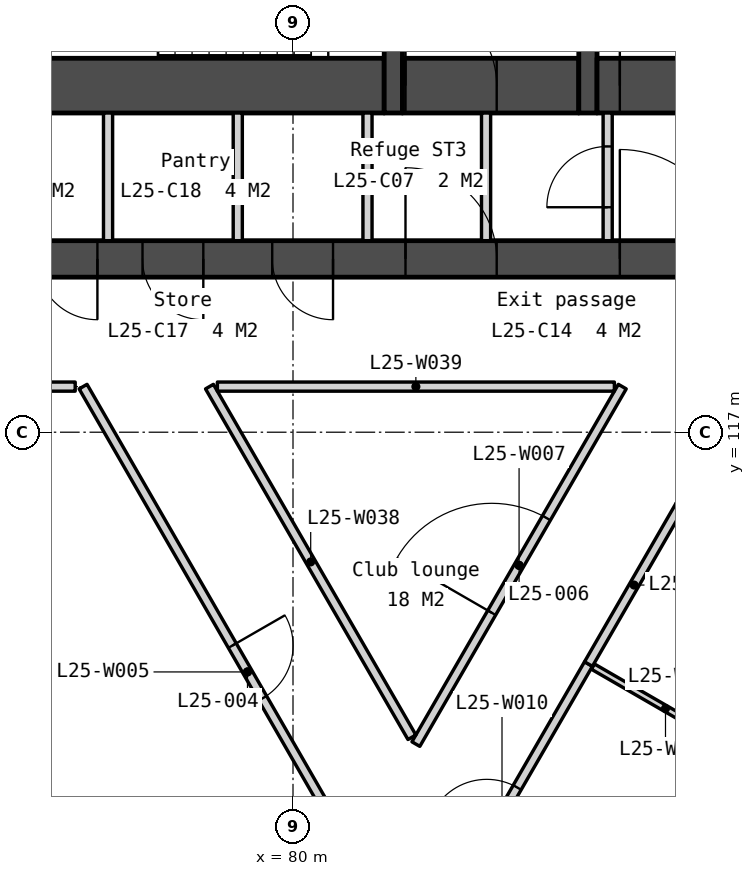
"""IFC4 building model, lengths in metres.
Left out: names, types, materials, properties, quantities, classifications, styles, units other than length and angle.
Written with IfcOpenShell. Run it as: python <this file> out.ifc"""

import sys

from ifc_helpers import new_model, si_unit, direction, frame, frame_2d, origin, place, context, subcontext, project, spatial, polyline, rectangle, outline, extrude, element, fill, save


model = new_model("IFC4")
c1 = context("Model", 3, precision=1e-05, world=origin(), true_north=direction((0.0, 1.0)))
c2 = subcontext(c1, "Body", "Model", "MODEL_VIEW")
j1 = project(units=[si_unit("LENGTHUNIT", "METRE"), si_unit("PLANEANGLEUNIT", "RADIAN")], contexts=[c1])
p1 = place(None, origin())
s1 = spatial("IfcSite", under=j1, at=p1, CompositionType="ELEMENT")
p2 = place(p1, origin())
s2 = spatial("IfcBuilding", under=s1, at=p2, CompositionType="ELEMENT")
p3 = place(p2, frame((0.0, 0.0, 102.8)))
s3 = spatial("IfcBuildingStorey", under=s2, at=p3, CompositionType="ELEMENT", Elevation=102.8)
p4 = place(p3, frame((66.0, 119.85, 0.0), z_axis=(0.0, 0.0, 1.0), x_axis=(1.0, 0.0, 0.0)))
e1 = element("IfcWall", 1, at=p4, inside=s3, PredefinedType="SOLIDWALL", context=c2, shape_type="SweptSolid", body=[
    extrude(rectangle(XDim=28.0, YDim=0.6, at=frame_2d((14.0, 0.0))), origin(), (0.0, 0.0, 1.0), 3.35),
])
p5 = place(p4, frame((6.825, 0.0, 0.0)))
e2 = element("IfcOpeningElement", 2, at=p5, cuts=e1, PredefinedType="OPENING", context=c2, shape_type="SweptSolid", body=[
    extrude(rectangle(XDim=1.8, YDim=2.1, at=frame_2d((0.9, 1.05))), frame((0.0, 0.31, 0.0), z_axis=(0.0, -1.0, 0.0), x_axis=(1.0, 0.0, 0.0)), (0.0, 0.0, 1.0), 0.62),
])
p6 = place(p4, frame((15.85, 0.0, 0.0)))
e3 = element("IfcOpeningElement", 3, at=p6, cuts=e1, PredefinedType="OPENING", context=c2, shape_type="SweptSolid", body=[
    extrude(rectangle(XDim=1.5, YDim=2.1, at=frame_2d((0.75, 1.05))), frame((0.0, 0.31, 0.0), z_axis=(0.0, -1.0, 0.0), x_axis=(1.0, 0.0, 0.0)), (0.0, 0.0, 1.0), 0.62),
])
p7 = place(p4, frame((19.375, 0.0, 0.0)))
e4 = element("IfcOpeningElement", 4, at=p7, cuts=e1, PredefinedType="OPENING", context=c2, shape_type="SweptSolid", body=[
    extrude(rectangle(XDim=1.8, YDim=2.1, at=frame_2d((0.9, 1.05))), frame((0.0, 0.31, 0.0), z_axis=(0.0, -1.0, 0.0), x_axis=(1.0, 0.0, 0.0)), (0.0, 0.0, 1.0), 0.62),
])
p8 = place(p4, frame((4.425, 0.0, 0.0)))
e5 = element("IfcOpeningElement", 5, at=p8, cuts=e1, PredefinedType="OPENING", context=c2, shape_type="SweptSolid", body=[
    extrude(rectangle(XDim=1.0, YDim=2.1, at=frame_2d((0.5, 1.05))), frame((0.0, 0.31, 0.0), z_axis=(0.0, -1.0, 0.0), x_axis=(1.0, 0.0, 0.0)), (0.0, 0.0, 1.0), 0.62),
])
p9 = place(p4, frame((9.783, 0.0, 0.0)))
e6 = element("IfcOpeningElement", 6, at=p9, cuts=e1, PredefinedType="OPENING", context=c2, shape_type="SweptSolid", body=[
    extrude(rectangle(XDim=1.0, YDim=2.1, at=frame_2d((0.5, 1.05))), frame((0.0, 0.31, 0.0), z_axis=(0.0, -1.0, 0.0), x_axis=(1.0, 0.0, 0.0)), (0.0, 0.0, 1.0), 0.62),
])
p10 = place(p4, frame((11.525, 0.0, 0.0)))
e7 = element("IfcOpeningElement", 7, at=p10, cuts=e1, PredefinedType="OPENING", context=c2, shape_type="SweptSolid", body=[
    extrude(rectangle(XDim=1.0, YDim=2.1, at=frame_2d((0.5, 1.05))), frame((0.0, 0.31, 0.0), z_axis=(0.0, -1.0, 0.0), x_axis=(1.0, 0.0, 0.0)), (0.0, 0.0, 1.0), 0.62),
])
p11 = place(p4, frame((13.658, 0.0, 0.0)))
e8 = element("IfcOpeningElement", 8, at=p11, cuts=e1, PredefinedType="OPENING", context=c2, shape_type="SweptSolid", body=[
    extrude(rectangle(XDim=1.0, YDim=2.1, at=frame_2d((0.5, 1.05))), frame((0.0, 0.31, 0.0), z_axis=(0.0, -1.0, 0.0), x_axis=(1.0, 0.0, 0.0)), (0.0, 0.0, 1.0), 0.62),
])
p12 = place(p4, frame((22.575, 0.0, 0.0)))
e9 = element("IfcOpeningElement", 9, at=p12, cuts=e1, PredefinedType="OPENING", context=c2, shape_type="SweptSolid", body=[
    extrude(rectangle(XDim=1.0, YDim=2.1, at=frame_2d((0.5, 1.05))), frame((0.0, 0.31, 0.0), z_axis=(0.0, -1.0, 0.0), x_axis=(1.0, 0.0, 0.0)), (0.0, 0.0, 1.0), 0.62),
])
p13 = place(p3, frame((75.3, 122.7, 0.0), z_axis=(0.0, 0.0, 1.0), x_axis=(1.0, 0.0, 0.0)))
e10 = element("IfcWall", 10, at=p13, inside=s3, PredefinedType="SOLIDWALL", context=c2, shape_type="SweptSolid", body=[
    extrude(rectangle(XDim=6.2, YDim=0.9, at=frame_2d((3.1, 0.0))), origin(), (0.0, 0.0, 1.0), 3.35),
])
for number, where, z_axis, x_axis in (
    (11, (76.958, 122.25, 0.0), (0.0, 0.0, 1.0), (0.0, -1.0, 0.0)),
    (12, (79.092, 122.25, 0.0), (0.0, 0.0, 1.0), (0.0, -1.0, 0.0)),
    (13, (81.225, 122.25, 0.0), (0.0, 0.0, 1.0), (0.0, -1.0, 0.0)),
):
    element("IfcWall", number, at=place(p3, frame(where, z_axis=z_axis, x_axis=x_axis)), inside=s3, PredefinedType="PARTITIONING", context=c2, shape_type="SweptSolid", body=[
        extrude(rectangle(XDim=2.1, YDim=0.15, at=frame_2d((1.05, 0.0))), origin(), (0.0, 0.0, 1.0), 3.35),
    ])
p14 = place(p3, frame((81.65, 125.7, 0.0), z_axis=(0.0, 0.0, 1.0), x_axis=(0.0, -1.0, 0.0)))
e14 = element("IfcWall", 14, at=p14, inside=s3, PredefinedType="SOLIDWALL", context=c2, shape_type="SweptSolid", body=[
    extrude(rectangle(XDim=3.45, YDim=0.3, at=frame_2d((1.725, 0.0))), origin(), (0.0, 0.0, 1.0), 3.35),
])
p15 = place(p14, frame((0.75, 0.0, 0.0)))
e15 = element("IfcOpeningElement", 15, at=p15, cuts=e14, PredefinedType="OPENING", context=c2, shape_type="SweptSolid", body=[
    extrude(rectangle(XDim=1.0, YDim=2.1, at=frame_2d((0.5, 1.05))), frame((0.0, 0.16, 0.0), z_axis=(0.0, -1.0, 0.0), x_axis=(1.0, 0.0, 0.0)), (0.0, 0.0, 1.0), 0.32),
])
p16 = place(p3, frame((81.8, 122.7, 0.0), z_axis=(0.0, 0.0, 1.0), x_axis=(1.0, 0.0, 0.0)))
e16 = element("IfcWall", 16, at=p16, inside=s3, PredefinedType="SOLIDWALL", context=c2, shape_type="SweptSolid", body=[
    extrude(rectangle(XDim=2.9, YDim=0.9, at=frame_2d((1.45, 0.0))), origin(), (0.0, 0.0, 1.0), 3.35),
])
p17 = place(p16, frame((0.05, 0.0, 0.0)))
e17 = element("IfcOpeningElement", 17, at=p17, cuts=e16, PredefinedType="OPENING", context=c2, shape_type="SweptSolid", body=[
    extrude(rectangle(XDim=1.5, YDim=2.1, at=frame_2d((0.75, 1.05))), frame((0.0, 0.46, 0.0), z_axis=(0.0, -1.0, 0.0), x_axis=(1.0, 0.0, 0.0)), (0.0, 0.0, 1.0), 0.92),
])
p18 = place(p3, frame((83.175, 122.25, 0.0), z_axis=(0.0, 0.0, 1.0), x_axis=(0.0, -1.0, 0.0)))
e18 = element("IfcWall", 18, at=p18, inside=s3, PredefinedType="PARTITIONING", context=c2, shape_type="SweptSolid", body=[
    extrude(rectangle(XDim=2.1, YDim=0.15, at=frame_2d((1.05, 0.0))), origin(), (0.0, 0.0, 1.0), 3.35),
])
p19 = place(p3, frame((84.85, 133.95, 0.0), z_axis=(0.0, 0.0, 1.0), x_axis=(0.0, -1.0, 0.0)))
e19 = element("IfcWall", 19, at=p19, inside=s3, PredefinedType="SOLIDWALL", context=c2, shape_type="SweptSolid", body=[
    extrude(rectangle(XDim=11.7, YDim=0.3, at=frame_2d((5.85, 0.0))), origin(), (0.0, 0.0, 1.0), 3.35),
])
p20 = place(p3, frame((85.0, 122.7, 0.0), z_axis=(0.0, 0.0, 1.0), x_axis=(1.0, 0.0, 0.0)))
e20 = element("IfcWall", 20, at=p20, inside=s3, PredefinedType="SOLIDWALL", context=c2, shape_type="SweptSolid", body=[
    extrude(rectangle(XDim=2.55, YDim=0.9, at=frame_2d((1.275, 0.0))), origin(), (0.0, 0.0, 1.0), 3.35),
])
p21 = place(p20, frame((0.375, 0.0, 0.0)))
e21 = element("IfcOpeningElement", 21, at=p21, cuts=e20, PredefinedType="OPENING", context=c2, shape_type="SweptSolid", body=[
    extrude(rectangle(XDim=1.8, YDim=2.1, at=frame_2d((0.9, 1.05))), frame((0.0, 0.46, 0.0), z_axis=(0.0, -1.0, 0.0), x_axis=(1.0, 0.0, 0.0)), (0.0, 0.0, 1.0), 0.92),
])
p22 = place(p3, frame((85.175, 122.25, 0.0), z_axis=(0.0, 0.0, 1.0), x_axis=(0.0, -1.0, 0.0)))
e22 = element("IfcWall", 22, at=p22, inside=s3, PredefinedType="PARTITIONING", context=c2, shape_type="SweptSolid", body=[
    extrude(rectangle(XDim=2.1, YDim=0.15, at=frame_2d((1.05, 0.0))), origin(), (0.0, 0.0, 1.0), 3.35),
])
p23 = place(p22, frame((0.55, 0.0, 0.0)))
e23 = element("IfcOpeningElement", 23, at=p23, cuts=e22, PredefinedType="OPENING", context=c2, shape_type="SweptSolid", body=[
    extrude(rectangle(XDim=1.0, YDim=2.1, at=frame_2d((0.5, 1.05))), frame((0.0, 0.085, 0.0), z_axis=(0.0, -1.0, 0.0), x_axis=(1.0, 0.0, 0.0)), (0.0, 0.0, 1.0), 0.17),
])
p24 = place(p3, frame((82.605, 93.333, -0.15), z_axis=(0.0, 0.0, 1.0), x_axis=(0.500000478905, 0.866025127289, 0.0)))
e24 = element("IfcWall", 24, at=p24, inside=s3, PredefinedType="SOLIDWALL", context=c2, shape_type="SweptSolid", body=[
    extrude(outline(polyline([(42.643, 0.0), (42.643, 3.5), (0.0, 3.5), (0.0, 0.0), (42.643, 0.0)])), frame((0.0, 0.225, 0.0), z_axis=(0.0, -1.0, 0.0), x_axis=(1.0, 0.0, 0.0)), (0.0, 0.0, 1.0), 0.45),
])
p25 = place(p24, frame((0.72, 0.0, 1.05)))
e25 = element("IfcOpeningElement", 25, at=p25, cuts=e24, PredefinedType="OPENING", context=c2, shape_type="SweptSolid", body=[
    extrude(rectangle(XDim=1.2, YDim=1.5, at=frame_2d((0.6, 0.75))), frame((0.0, 0.235, 0.0), z_axis=(0.0, -1.0, 0.0), x_axis=(1.0, 0.0, 0.0)), (0.0, 0.0, 1.0), 0.47),
])
p26 = place(p24, frame((7.079, 0.0, 1.05)))
e26 = element("IfcOpeningElement", 26, at=p26, cuts=e24, PredefinedType="OPENING", context=c2, shape_type="SweptSolid", body=[
    extrude(rectangle(XDim=1.2, YDim=1.5, at=frame_2d((0.6, 0.75))), frame((0.0, 0.235, 0.0), z_axis=(0.0, -1.0, 0.0), x_axis=(1.0, 0.0, 0.0)), (0.0, 0.0, 1.0), 0.47),
])
p27 = place(p24, frame((8.779, 0.0, 1.05)))
e27 = element("IfcOpeningElement", 27, at=p27, cuts=e24, PredefinedType="OPENING", context=c2, shape_type="SweptSolid", body=[
    extrude(rectangle(XDim=1.2, YDim=1.5, at=frame_2d((0.6, 0.75))), frame((0.0, 0.235, 0.0), z_axis=(0.0, -1.0, 0.0), x_axis=(1.0, 0.0, 0.0)), (0.0, 0.0, 1.0), 0.47),
])
p28 = place(p24, frame((15.607, 0.0, 1.05)))
e28 = element("IfcOpeningElement", 28, at=p28, cuts=e24, PredefinedType="OPENING", context=c2, shape_type="SweptSolid", body=[
    extrude(rectangle(XDim=1.2, YDim=1.5, at=frame_2d((0.6, 0.75))), frame((0.0, 0.235, 0.0), z_axis=(0.0, -1.0, 0.0), x_axis=(1.0, 0.0, 0.0)), (0.0, 0.0, 1.0), 0.47),
])
p29 = place(p24, frame((17.307, 0.0, 1.05)))
e29 = element("IfcOpeningElement", 29, at=p29, cuts=e24, PredefinedType="OPENING", context=c2, shape_type="SweptSolid", body=[
    extrude(rectangle(XDim=1.2, YDim=1.5, at=frame_2d((0.6, 0.75))), frame((0.0, 0.235, 0.0), z_axis=(0.0, -1.0, 0.0), x_axis=(1.0, 0.0, 0.0)), (0.0, 0.0, 1.0), 0.47),
])
p30 = place(p24, frame((24.136, 0.0, 1.05)))
e30 = element("IfcOpeningElement", 30, at=p30, cuts=e24, PredefinedType="OPENING", context=c2, shape_type="SweptSolid", body=[
    extrude(rectangle(XDim=1.2, YDim=1.5, at=frame_2d((0.6, 0.75))), frame((0.0, 0.235, 0.0), z_axis=(0.0, -1.0, 0.0), x_axis=(1.0, 0.0, 0.0)), (0.0, 0.0, 1.0), 0.47),
])
p31 = place(p24, frame((25.836, 0.0, 1.05)))
e31 = element("IfcOpeningElement", 31, at=p31, cuts=e24, PredefinedType="OPENING", context=c2, shape_type="SweptSolid", body=[
    extrude(rectangle(XDim=1.2, YDim=1.5, at=frame_2d((0.6, 0.75))), frame((0.0, 0.235, 0.0), z_axis=(0.0, -1.0, 0.0), x_axis=(1.0, 0.0, 0.0)), (0.0, 0.0, 1.0), 0.47),
])
p32 = place(p24, frame((32.665, 0.0, 1.05)))
e32 = element("IfcOpeningElement", 32, at=p32, cuts=e24, PredefinedType="OPENING", context=c2, shape_type="SweptSolid", body=[
    extrude(rectangle(XDim=1.2, YDim=1.5, at=frame_2d((0.6, 0.75))), frame((0.0, 0.235, 0.0), z_axis=(0.0, -1.0, 0.0), x_axis=(1.0, 0.0, 0.0)), (0.0, 0.0, 1.0), 0.47),
])
p33 = place(p24, frame((34.365, 0.0, 1.05)))
e33 = element("IfcOpeningElement", 33, at=p33, cuts=e24, PredefinedType="OPENING", context=c2, shape_type="SweptSolid", body=[
    extrude(rectangle(XDim=1.2, YDim=1.5, at=frame_2d((0.6, 0.75))), frame((0.0, 0.235, 0.0), z_axis=(0.0, -1.0, 0.0), x_axis=(1.0, 0.0, 0.0)), (0.0, 0.0, 1.0), 0.47),
])
p34 = place(p24, frame((40.722, 0.0, 1.05)))
e34 = element("IfcOpeningElement", 34, at=p34, cuts=e24, PredefinedType="OPENING", context=c2, shape_type="SweptSolid", body=[
    extrude(rectangle(XDim=1.2, YDim=1.5, at=frame_2d((0.6, 0.75))), frame((0.0, 0.235, 0.0), z_axis=(0.0, -1.0, 0.0), x_axis=(1.0, 0.0, 0.0)), (0.0, 0.0, 1.0), 0.47),
])
p35 = place(p3, frame((76.548, 117.75, 0.0), z_axis=(0.0, 0.0, 1.0), x_axis=(0.499203981413, -0.866484497808, 0.0)))
e35 = element("IfcWall", 35, at=p35, inside=s3, PredefinedType="PARTITIONING", context=c2, shape_type="SweptSolid", body=[
    extrude(rectangle(XDim=10.832, YDim=0.15, at=frame_2d((5.416, 0.0))), origin(), (0.0, 0.0, 1.0), 3.35),
])
p36 = place(p35, frame((4.916, 0.0, 0.0)))
e36 = element("IfcOpeningElement", 36, at=p36, cuts=e35, PredefinedType="OPENING", context=c2, shape_type="SweptSolid", body=[
    extrude(rectangle(XDim=1.0, YDim=2.1, at=frame_2d((0.5, 1.05))), frame((0.0, 0.085, 0.0), z_axis=(0.0, -1.0, 0.0), x_axis=(1.0, 0.0, 0.0)), (0.0, 0.0, 1.0), 0.17),
])
p37 = place(p3, frame((82.021, 111.871, 0.0), z_axis=(0.0, 0.0, 1.0), x_axis=(0.500006764785, 0.866021498099, 0.0)))
e37 = element("IfcWall", 37, at=p37, inside=s3, PredefinedType="PARTITIONING", context=c2, shape_type="SweptSolid", body=[
    extrude(rectangle(XDim=6.789, YDim=0.15, at=frame_2d((3.395, 0.0))), origin(), (0.0, 0.0, 1.0), 3.35),
])
p38 = place(p37, frame((2.495, 0.0, 0.0)))
e38 = element("IfcOpeningElement", 38, at=p38, cuts=e37, PredefinedType="OPENING", context=c2, shape_type="SweptSolid", body=[
    extrude(rectangle(XDim=1.8, YDim=2.1, at=frame_2d((0.9, 1.05))), frame((0.0, 0.085, 0.0), z_axis=(0.0, -1.0, 0.0), x_axis=(1.0, 0.0, 0.0)), (0.0, 0.0, 1.0), 0.17),
])
p39 = place(p3, frame((82.015, 108.26, 0.0), z_axis=(0.0, 0.0, 1.0), x_axis=(0.500002303494, 0.866024073857, 0.0)))
e39 = element("IfcWall", 39, at=p39, inside=s3, PredefinedType="PARTITIONING", context=c2, shape_type="SweptSolid", body=[
    extrude(rectangle(XDim=5.689, YDim=0.15, at=frame_2d((2.844, 0.0))), origin(), (0.0, 0.0, 1.0), 3.35),
])
p40 = place(p39, frame((2.344, 0.0, 0.0)))
e40 = element("IfcOpeningElement", 40, at=p40, cuts=e39, PredefinedType="OPENING", context=c2, shape_type="SweptSolid", body=[
    extrude(rectangle(XDim=1.0, YDim=2.1, at=frame_2d((0.5, 1.05))), frame((0.0, 0.085, 0.0), z_axis=(0.0, -1.0, 0.0), x_axis=(1.0, 0.0, 0.0)), (0.0, 0.0, 1.0), 0.17),
])
p41 = place(p3, frame((84.933, 113.145, 0.0), z_axis=(0.0, 0.0, 1.0), x_axis=(0.866004076171, -0.500036938691, 0.0)))
e41 = element("IfcWall", 41, at=p41, inside=s3, PredefinedType="PARTITIONING", context=c2, shape_type="SweptSolid", body=[
    extrude(rectangle(XDim=2.755, YDim=0.1, at=frame_2d((1.377, 0.0))), origin(), (0.0, 0.0, 1.0), 3.35),
])
p42 = place(p3, frame((84.859, 113.187, 0.0), z_axis=(0.0, 0.0, 1.0), x_axis=(0.50002537861, 0.866010750942, 0.0)))
e42 = element("IfcWall", 42, at=p42, inside=s3, PredefinedType="PARTITIONING", context=c2, shape_type="SweptSolid", body=[
    extrude(rectangle(XDim=3.0, YDim=0.15, at=frame_2d((1.5, 0.0))), origin(), (0.0, 0.0, 1.0), 3.35),
])
p43 = place(p3, frame((83.309, 102.902, 0.0), z_axis=(0.0, 0.0, 1.0), x_axis=(0.499996436937, 0.86602746091, 0.0)))
e43 = element("IfcWall", 43, at=p43, inside=s3, PredefinedType="PARTITIONING", context=c2, shape_type="SweptSolid", body=[
    extrude(rectangle(XDim=12.573, YDim=0.1, at=frame_2d((6.286, 0.0))), origin(), (0.0, 0.0, 1.0), 3.35),
])
p44 = place(p43, frame((5.836, 0.0, 0.0)))
e44 = element("IfcOpeningElement", 44, at=p44, cuts=e43, PredefinedType="OPENING", context=c2, shape_type="SweptSolid", body=[
    extrude(rectangle(XDim=0.9, YDim=2.1, at=frame_2d((0.45, 1.05))), frame((0.0, 0.06, 0.0), z_axis=(0.0, -1.0, 0.0), x_axis=(1.0, 0.0, 0.0)), (0.0, 0.0, 1.0), 0.12),
])
p45 = place(p3, frame((72.506, 117.75, 0.0), z_axis=(0.0, 0.0, 1.0), x_axis=(1.0, 0.0, 0.0)))
e45 = element("IfcWall", 45, at=p45, inside=s3, PredefinedType="PARTITIONING", context=c2, shape_type="SweptSolid", body=[
    extrude(rectangle(XDim=3.912, YDim=0.15, at=frame_2d((1.956, 0.0))), origin(), (0.0, 0.0, 1.0), 3.35),
])
p46 = place(p3, frame((78.626, 117.75, 0.0), z_axis=(0.0, 0.0, 1.0), x_axis=(0.499995378973, -0.866028071719, 0.0)))
e46 = element("IfcWall", 46, at=p46, inside=s3, PredefinedType="PARTITIONING", context=c2, shape_type="SweptSolid", body=[
    extrude(rectangle(XDim=6.659, YDim=0.15, at=frame_2d((3.33, 0.0))), origin(), (0.0, 0.0, 1.0), 3.35),
])
p47 = place(p3, frame((78.756, 117.75, 0.0), z_axis=(0.0, 0.0, 1.0), x_axis=(1.0, 0.0, 0.0)))
e47 = element("IfcWall", 47, at=p47, inside=s3, PredefinedType="PARTITIONING", context=c2, shape_type="SweptSolid", body=[
    extrude(rectangle(XDim=6.529, YDim=0.15, at=frame_2d((3.265, 0.0))), origin(), (0.0, 0.0, 1.0), 3.35),
])
p48 = place(p21, origin())
e48 = element("IfcDoor", 48, at=p48, inside=s3, OperationType="DOUBLE_DOOR_DOUBLE_SWING", PredefinedType="DOOR", context=c2, shape_type="SweptSolid", body=[
    extrude(rectangle(XDim=1.8, YDim=2.1, at=frame_2d((0.9, 1.05))), frame((0.0, 0.025, 0.0), z_axis=(0.0, -1.0, 0.0), x_axis=(1.0, 0.0, 0.0)), (0.0, 0.0, 1.0), 0.05),
])
fill(e21, e48)
p49 = place(p17, origin())
e49 = element("IfcDoor", 49, at=p49, inside=s3, OperationType="DOUBLE_DOOR_DOUBLE_SWING", PredefinedType="DOOR", context=c2, shape_type="SweptSolid", body=[
    extrude(rectangle(XDim=1.5, YDim=2.1, at=frame_2d((0.75, 1.05))), frame((0.0, 0.025, 0.0), z_axis=(0.0, -1.0, 0.0), x_axis=(1.0, 0.0, 0.0)), (0.0, 0.0, 1.0), 0.05),
])
fill(e17, e49)
p50 = place(p6, origin())
e50 = element("IfcDoor", 50, at=p50, inside=s3, OperationType="DOUBLE_DOOR_DOUBLE_SWING", PredefinedType="DOOR", context=c2, shape_type="SweptSolid", body=[
    extrude(rectangle(XDim=1.5, YDim=2.1, at=frame_2d((0.75, 1.05))), frame((0.0, 0.025, 0.0), z_axis=(0.0, -1.0, 0.0), x_axis=(1.0, 0.0, 0.0)), (0.0, 0.0, 1.0), 0.05),
])
fill(e3, e50)
p51 = place(p7, origin())
e51 = element("IfcDoor", 51, at=p51, inside=s3, OperationType="DOUBLE_DOOR_DOUBLE_SWING", PredefinedType="DOOR", context=c2, shape_type="SweptSolid", body=[
    extrude(rectangle(XDim=1.8, YDim=2.1, at=frame_2d((0.9, 1.05))), frame((0.0, 0.025, 0.0), z_axis=(0.0, -1.0, 0.0), x_axis=(1.0, 0.0, 0.0)), (0.0, 0.0, 1.0), 0.05),
])
fill(e4, e51)
p52 = place(p9, origin())
e52 = element("IfcDoor", 52, at=p52, inside=s3, OperationType="SINGLE_SWING_RIGHT", PredefinedType="DOOR", context=c2, shape_type="SweptSolid", body=[
    extrude(rectangle(XDim=1.0, YDim=2.1, at=frame_2d((0.5, 1.05))), frame((0.0, 0.025, 0.0), z_axis=(0.0, -1.0, 0.0), x_axis=(1.0, 0.0, 0.0)), (0.0, 0.0, 1.0), 0.05),
])
fill(e6, e52)
p53 = place(p10, origin())
e53 = element("IfcDoor", 53, at=p53, inside=s3, OperationType="SINGLE_SWING_RIGHT", PredefinedType="DOOR", context=c2, shape_type="SweptSolid", body=[
    extrude(rectangle(XDim=1.0, YDim=2.1, at=frame_2d((0.5, 1.05))), frame((0.0, 0.025, 0.0), z_axis=(0.0, -1.0, 0.0), x_axis=(1.0, 0.0, 0.0)), (0.0, 0.0, 1.0), 0.05),
])
fill(e7, e53)
p54 = place(p11, origin())
e54 = element("IfcDoor", 54, at=p54, inside=s3, OperationType="SINGLE_SWING_RIGHT", PredefinedType="DOOR", context=c2, shape_type="SweptSolid", body=[
    extrude(rectangle(XDim=1.0, YDim=2.1, at=frame_2d((0.5, 1.05))), frame((0.0, 0.025, 0.0), z_axis=(0.0, -1.0, 0.0), x_axis=(1.0, 0.0, 0.0)), (0.0, 0.0, 1.0), 0.05),
])
fill(e8, e54)
p55 = place(p23, origin())
e55 = element("IfcDoor", 55, at=p55, inside=s3, OperationType="SINGLE_SWING_RIGHT", PredefinedType="DOOR", context=c2, shape_type="SweptSolid", body=[
    extrude(rectangle(XDim=1.0, YDim=2.1, at=frame_2d((0.5, 1.05))), frame((0.0, 0.025, 0.0), z_axis=(0.0, -1.0, 0.0), x_axis=(1.0, 0.0, 0.0)), (0.0, 0.0, 1.0), 0.05),
])
fill(e23, e55)
p56 = place(p36, origin())
e56 = element("IfcDoor", 56, at=p56, inside=s3, OperationType="SINGLE_SWING_LEFT", PredefinedType="DOOR", context=c2, shape_type="SweptSolid", body=[
    extrude(rectangle(XDim=1.0, YDim=2.1, at=frame_2d((0.5, 1.05))), frame((0.0, 0.025, 0.0), z_axis=(0.0, -1.0, 0.0), x_axis=(1.0, 0.0, 0.0)), (0.0, 0.0, 1.0), 0.05),
])
fill(e36, e56)
p57 = place(p38, origin())
e57 = element("IfcDoor", 57, at=p57, inside=s3, OperationType="SINGLE_SWING_LEFT", PredefinedType="DOOR", context=c2, shape_type="SweptSolid", body=[
    extrude(rectangle(XDim=1.8, YDim=2.1, at=frame_2d((0.9, 1.05))), frame((0.0, 0.025, 0.0), z_axis=(0.0, -1.0, 0.0), x_axis=(1.0, 0.0, 0.0)), (0.0, 0.0, 1.0), 0.05),
])
fill(e38, e57)
p58 = place(p40, origin())
e58 = element("IfcDoor", 58, at=p58, inside=s3, OperationType="SINGLE_SWING_LEFT", PredefinedType="DOOR", context=c2, shape_type="SweptSolid", body=[
    extrude(rectangle(XDim=1.0, YDim=2.1, at=frame_2d((0.5, 1.05))), frame((0.0, 0.025, 0.0), z_axis=(0.0, -1.0, 0.0), x_axis=(1.0, 0.0, 0.0)), (0.0, 0.0, 1.0), 0.05),
])
fill(e40, e58)
save(model, sys.argv[1])
